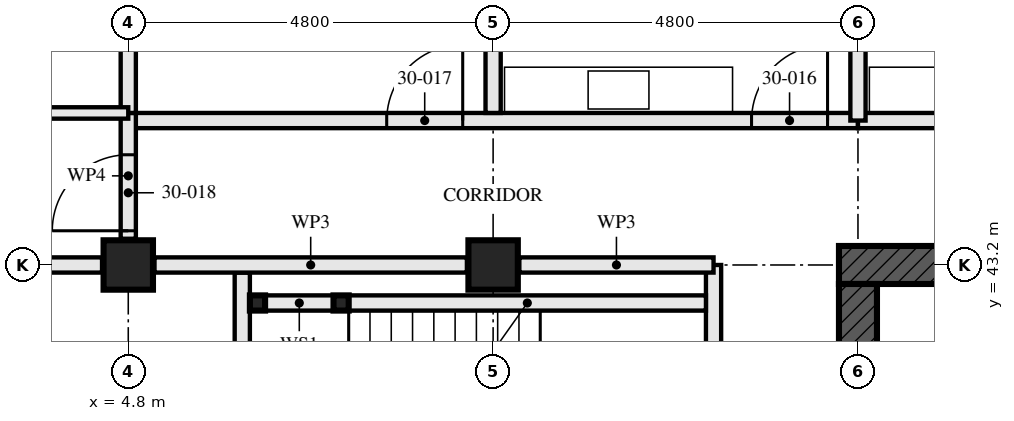
"""IFC4 building model, lengths in metres.
Left out: names, types, materials, properties, quantities, classifications, styles, units other than length and angle.
Written with IfcOpenShell. Run it as: python <this file> out.ifc"""

import sys

from ifc_helpers import new_model, si_unit, direction, frame, frame_2d, origin, origin_2d, place, context, subcontext, project, spatial, rectangle, hollow_rectangle, extrude, element, fill, save


model = new_model("IFC4")
c1 = context("Model", 3, precision=1e-05, world=origin(), true_north=direction((0.0, 1.0)))
c2 = subcontext(c1, "Body", "Model", "MODEL_VIEW")
j1 = project(units=[si_unit("LENGTHUNIT", "METRE"), si_unit("PLANEANGLEUNIT", "RADIAN")], contexts=[c1])
p1 = place(None, origin())
s1 = spatial("IfcSite", under=j1, at=p1, CompositionType="ELEMENT")
p2 = place(p1, origin())
s2 = spatial("IfcBuilding", under=s1, at=p2, CompositionType="ELEMENT")
p3 = place(p2, frame((0.0, 0.0, 112.0)))
s3 = spatial("IfcBuildingStorey", under=s2, at=p3, CompositionType="ELEMENT", Elevation=112.0)
for number, where, z_axis, x_axis in (
    (1, (4.8, 43.2, 0.0), (0.0, 0.0, 1.0), (0.0, 1.0, 0.0)),
    (2, (9.6, 43.2, 0.0), (0.0, 0.0, 1.0), (0.0, 1.0, 0.0)),
):
    element("IfcColumn", number, at=place(p3, frame(where, z_axis=z_axis, x_axis=x_axis)), inside=s3, PredefinedType="COLUMN", context=c2, shape_type="SweptSolid", body=[
        extrude(hollow_rectangle(XDim=0.65, YDim=0.65, WallThickness=0.05, at=origin_2d()), origin(), (0.0, 0.0, 1.0), 3.5),
    ])
p4 = place(p3, frame((29.05, 43.2, -0.17), z_axis=(0.0, 0.0, 1.0), x_axis=(-1.0, 0.0, 0.0)))
e3 = element("IfcWall", 3, at=p4, inside=s3, PredefinedType="SHEAR", context=c2, shape_type="SweptSolid", body=[
    extrude(rectangle(XDim=14.9, YDim=0.5, at=frame_2d((7.45, 0.0))), origin(), (0.0, 0.0, 1.0), 3.5),
])
p5 = place(p4, frame((6.85, 0.0, 0.17)))
e4 = element("IfcOpeningElement", 4, at=p5, cuts=e3, PredefinedType="OPENING", context=c2, shape_type="SweptSolid", body=[
    extrude(rectangle(XDim=1.2, YDim=2.1, at=frame_2d((0.6, 1.05))), frame((0.0, 0.26, 0.0), z_axis=(0.0, -1.0, 0.0), x_axis=(1.0, 0.0, 0.0)), (0.0, 0.0, 1.0), 0.521),
])
p6 = place(p3, frame((14.4, 42.95, -0.17), z_axis=(0.0, 0.0, 1.0), x_axis=(0.0, -1.0, 0.0)))
e5 = element("IfcWall", 5, at=p6, inside=s3, PredefinedType="SHEAR", context=c2, shape_type="SweptSolid", body=[
    extrude(rectangle(XDim=13.9, YDim=0.5, at=frame_2d((6.95, 0.0))), origin(), (0.0, 0.0, 1.0), 3.5),
])
p7 = place(p6, frame((6.35, 0.0, 0.17)))
e6 = element("IfcOpeningElement", 6, at=p7, cuts=e5, PredefinedType="OPENING", context=c2, shape_type="SweptSolid", body=[
    extrude(rectangle(XDim=1.2, YDim=2.1, at=frame_2d((0.6, 1.05))), frame((0.0, 0.26, 0.0), z_axis=(0.0, -1.0, 0.0), x_axis=(1.0, 0.0, 0.0)), (0.0, 0.0, 1.0), 0.521),
])
for number, where, z_axis, x_axis in (
    (7, (6.5, 42.7, 0.0), (0.0, 0.0, 1.0), (1.0, 0.0, 0.0)),
    (8, (7.6, 42.7, 0.0), (0.0, 0.0, 1.0), (1.0, 0.0, 0.0)),
):
    element("IfcColumn", number, at=place(p3, frame(where, z_axis=z_axis, x_axis=x_axis)), inside=s3, PredefinedType="COLUMN", context=c2, shape_type="SweptSolid", body=[
        extrude(hollow_rectangle(XDim=0.2, YDim=0.2, WallThickness=0.008, at=origin_2d()), origin(), (0.0, 0.0, 1.0), 3.33),
    ])
p8 = place(p3, frame((6.6, 42.7, 0.0), z_axis=(0.0, 0.0, 1.0), x_axis=(1.0, 0.0, 0.0)))
e9 = element("IfcWall", 9, at=p8, inside=s3, PredefinedType="SOLIDWALL", context=c2, shape_type="SweptSolid", body=[
    extrude(rectangle(XDim=0.9, YDim=0.2, at=frame_2d((0.45, 0.0))), origin(), (0.0, 0.0, 1.0), 2.99),
])
p9 = place(p3, frame((7.7, 42.7, 0.0), z_axis=(0.0, 0.0, 1.0), x_axis=(1.0, 0.0, 0.0)))
e10 = element("IfcWall", 10, at=p9, inside=s3, PredefinedType="SOLIDWALL", context=c2, shape_type="SweptSolid", body=[
    extrude(rectangle(XDim=4.7, YDim=0.2, at=frame_2d((2.35, 0.0))), origin(), (0.0, 0.0, 1.0), 2.99),
])
p10 = place(p3, frame((6.3, 43.1, 0.0), z_axis=(0.0, 0.0, 1.0), x_axis=(0.0, -1.0, 0.0)))
e11 = element("IfcWall", 11, at=p10, inside=s3, PredefinedType="SOLIDWALL", context=c2, shape_type="SweptSolid", body=[
    extrude(rectangle(XDim=3.3, YDim=0.2, at=frame_2d((1.65, 0.0))), origin(), (0.0, 0.0, 1.0), 3.33),
])
p11 = place(p3, frame((12.5, 43.2, 0.0), z_axis=(0.0, 0.0, 1.0), x_axis=(0.0, -1.0, 0.0)))
e12 = element("IfcWall", 12, at=p11, inside=s3, PredefinedType="PARTITIONING", context=c2, shape_type="SweptSolid", body=[
    extrude(rectangle(XDim=14.84, YDim=0.2, at=frame_2d((7.42, 0.0))), origin(), (0.0, 0.0, 1.0), 2.32),
])
p12 = place(p11, frame((1.4, 0.0, 0.0)))
e13 = element("IfcOpeningElement", 13, at=p12, cuts=e12, PredefinedType="OPENING", context=c2, shape_type="SweptSolid", body=[
    extrude(rectangle(XDim=1.0, YDim=2.1, at=frame_2d((0.5, 1.05))), frame((0.0, 0.111, 0.0), z_axis=(0.0, -1.0, 0.0), x_axis=(1.0, 0.0, 0.0)), (0.0, 0.0, 1.0), 0.221),
])
p13 = place(p11, frame((5.2, 0.0, 0.0)))
e14 = element("IfcOpeningElement", 14, at=p13, cuts=e12, PredefinedType="OPENING", context=c2, shape_type="SweptSolid", body=[
    extrude(rectangle(XDim=1.0, YDim=2.1, at=frame_2d((0.5, 1.05))), frame((0.0, 0.111, 0.0), z_axis=(0.0, -1.0, 0.0), x_axis=(1.0, 0.0, 0.0)), (0.0, 0.0, 1.0), 0.221),
])
p14 = place(p11, frame((13.0, 0.0, 0.0)))
e15 = element("IfcOpeningElement", 15, at=p14, cuts=e12, PredefinedType="OPENING", context=c2, shape_type="SweptSolid", body=[
    extrude(rectangle(XDim=1.0, YDim=2.1, at=frame_2d((0.5, 1.05))), frame((0.0, 0.111, 0.0), z_axis=(0.0, -1.0, 0.0), x_axis=(1.0, 0.0, 0.0)), (0.0, 0.0, 1.0), 0.221),
])
p15 = place(p3, frame((9.6, 57.356, 0.0), z_axis=(0.0, 0.0, 1.0), x_axis=(0.0, -1.0, 0.0)))
e16 = element("IfcWall", 16, at=p15, inside=s3, PredefinedType="PARTITIONING", context=c2, shape_type="SweptSolid", body=[
    extrude(rectangle(XDim=12.156, YDim=0.2, at=frame_2d((6.078, 0.0))), origin(), (0.0, 0.0, 1.0), 2.55),
])
p16 = place(p3, frame((4.8, 52.48, 0.0), z_axis=(0.0, 0.0, 1.0), x_axis=(0.0, -1.0, 0.0)))
e17 = element("IfcWall", 17, at=p16, inside=s3, PredefinedType="PARTITIONING", context=c2, shape_type="SweptSolid", body=[
    extrude(rectangle(XDim=7.28, YDim=0.2, at=frame_2d((3.64, 0.0))), origin(), (0.0, 0.0, 1.0), 2.55),
])
p17 = place(p3, frame((4.8, 45.2, 0.0), z_axis=(0.0, 0.0, 1.0), x_axis=(-1.0, 0.0, 0.0)))
e18 = element("IfcWall", 18, at=p17, inside=s3, PredefinedType="PARTITIONING", context=c2, shape_type="SweptSolid", body=[
    extrude(rectangle(XDim=2.8, YDim=0.15, at=frame_2d((1.4, 0.0))), origin(), (0.0, 0.0, 1.0), 3.33),
])
p18 = place(p3, frame((14.4, 45.1, 0.0), z_axis=(0.0, 0.0, 1.0), x_axis=(-1.0, 0.0, 0.0)))
e19 = element("IfcWall", 19, at=p18, inside=s3, PredefinedType="PARTITIONING", context=c2, shape_type="SweptSolid", body=[
    extrude(rectangle(XDim=9.6, YDim=0.2, at=frame_2d((4.8, 0.0))), origin(), (0.0, 0.0, 1.0), 3.33),
])
p19 = place(p18, frame((0.4, 0.0, 0.0)))
e20 = element("IfcOpeningElement", 20, at=p19, cuts=e19, PredefinedType="OPENING", context=c2, shape_type="SweptSolid", body=[
    extrude(rectangle(XDim=1.0, YDim=2.1, at=frame_2d((0.5, 1.05))), frame((0.0, 0.111, 0.0), z_axis=(0.0, -1.0, 0.0), x_axis=(1.0, 0.0, 0.0)), (0.0, 0.0, 1.0), 0.221),
])
p20 = place(p18, frame((5.2, 0.0, 0.0)))
e21 = element("IfcOpeningElement", 21, at=p20, cuts=e19, PredefinedType="OPENING", context=c2, shape_type="SweptSolid", body=[
    extrude(rectangle(XDim=1.0, YDim=2.1, at=frame_2d((0.5, 1.05))), frame((0.0, 0.111, 0.0), z_axis=(0.0, -1.0, 0.0), x_axis=(1.0, 0.0, 0.0)), (0.0, 0.0, 1.0), 0.221),
])
p21 = place(p3, frame((4.8, 45.2, 0.0), z_axis=(0.0, 0.0, 1.0), x_axis=(0.0, -1.0, 0.0)))
e22 = element("IfcWall", 22, at=p21, inside=s3, PredefinedType="PARTITIONING", context=c2, shape_type="SweptSolid", body=[
    extrude(rectangle(XDim=1.655, YDim=0.2, at=frame_2d((0.828, 0.0))), origin(), (0.0, 0.0, 1.0), 3.33),
])
p22 = place(p21, frame((0.55, 0.0, 0.0)))
e23 = element("IfcOpeningElement", 23, at=p22, cuts=e22, PredefinedType="OPENING", context=c2, shape_type="SweptSolid", body=[
    extrude(rectangle(XDim=1.0, YDim=2.1, at=frame_2d((0.5, 1.05))), frame((0.0, 0.111, 0.0), z_axis=(0.0, -1.0, 0.0), x_axis=(1.0, 0.0, 0.0)), (0.0, 0.0, 1.0), 0.221),
])
p23 = place(p3, frame((29.24, 45.1, 0.0), z_axis=(0.0, 0.0, 1.0), x_axis=(-1.0, 0.0, 0.0)))
e24 = element("IfcWall", 24, at=p23, inside=s3, PredefinedType="PARTITIONING", context=c2, shape_type="SweptSolid", body=[
    extrude(rectangle(XDim=14.84, YDim=0.2, at=frame_2d((7.42, 0.0))), origin(), (0.0, 0.0, 1.0), 2.32),
])
p24 = place(p23, frame((0.84, 0.0, 0.0)))
e25 = element("IfcOpeningElement", 25, at=p24, cuts=e24, PredefinedType="OPENING", context=c2, shape_type="SweptSolid", body=[
    extrude(rectangle(XDim=1.0, YDim=2.1, at=frame_2d((0.5, 1.05))), frame((0.0, 0.111, 0.0), z_axis=(0.0, -1.0, 0.0), x_axis=(1.0, 0.0, 0.0)), (0.0, 0.0, 1.0), 0.221),
])
p25 = place(p23, frame((10.44, 0.0, 0.0)))
e26 = element("IfcOpeningElement", 26, at=p25, cuts=e24, PredefinedType="OPENING", context=c2, shape_type="SweptSolid", body=[
    extrude(rectangle(XDim=1.0, YDim=2.1, at=frame_2d((0.5, 1.05))), frame((0.0, 0.111, 0.0), z_axis=(0.0, -1.0, 0.0), x_axis=(1.0, 0.0, 0.0)), (0.0, 0.0, 1.0), 0.221),
])
p26 = place(p3, frame((12.5, 43.2, 0.0), z_axis=(0.0, 0.0, 1.0), x_axis=(-1.0, 0.0, 0.0)))
e27 = element("IfcWall", 27, at=p26, inside=s3, PredefinedType="PARTITIONING", context=c2, shape_type="SweptSolid", body=[
    extrude(rectangle(XDim=2.555, YDim=0.2, at=frame_2d((1.277, 0.0))), origin(), (0.0, 0.0, 1.0), 2.32),
])
p27 = place(p3, frame((9.255, 43.2, 0.0), z_axis=(0.0, 0.0, 1.0), x_axis=(-1.0, 0.0, 0.0)))
e28 = element("IfcWall", 28, at=p27, inside=s3, PredefinedType="PARTITIONING", context=c2, shape_type="SweptSolid", body=[
    extrude(rectangle(XDim=4.11, YDim=0.2, at=frame_2d((2.055, 0.0))), origin(), (0.0, 0.0, 1.0), 2.32),
])
p28 = place(p3, frame((4.455, 43.2, 0.0), z_axis=(0.0, 0.0, 1.0), x_axis=(-1.0, 0.0, 0.0)))
e29 = element("IfcWall", 29, at=p28, inside=s3, PredefinedType="PARTITIONING", context=c2, shape_type="SweptSolid", body=[
    extrude(rectangle(XDim=4.16, YDim=0.2, at=frame_2d((2.08, 0.0))), origin(), (0.0, 0.0, 1.0), 2.32),
])
p29 = place(p3, frame((14.4, 45.1, 0.0), z_axis=(0.0, 0.0, 1.0), x_axis=(0.0, 1.0, 0.0)))
e30 = element("IfcWall", 30, at=p29, inside=s3, PredefinedType="PARTITIONING", context=c2, shape_type="SweptSolid", body=[
    extrude(rectangle(XDim=2.615, YDim=0.2, at=frame_2d((1.307, 0.0))), origin(), (0.0, 0.0, 1.0), 2.32),
])
p30 = place(p19, frame((1.0, 0.0, 0.0), z_axis=(0.0, 0.0, 1.0), x_axis=(-1.0, 0.0, 0.0)))
e31 = element("IfcDoor", 31, at=p30, inside=s3, OperationType="SINGLE_SWING_LEFT", PredefinedType="DOOR", context=c2, shape_type="SweptSolid", body=[
    extrude(rectangle(XDim=1.0, YDim=2.1, at=frame_2d((0.5, 1.05))), frame((0.0, 0.027, 0.0), z_axis=(0.0, -1.0, 0.0), x_axis=(1.0, 0.0, 0.0)), (0.0, 0.0, 1.0), 0.054),
])
fill(e20, e31)
p31 = place(p20, frame((1.0, 0.0, 0.0), z_axis=(0.0, 0.0, 1.0), x_axis=(-1.0, 0.0, 0.0)))
e32 = element("IfcDoor", 32, at=p31, inside=s3, OperationType="SINGLE_SWING_LEFT", PredefinedType="DOOR", context=c2, shape_type="SweptSolid", body=[
    extrude(rectangle(XDim=1.0, YDim=2.1, at=frame_2d((0.5, 1.05))), frame((0.0, 0.027, 0.0), z_axis=(0.0, -1.0, 0.0), x_axis=(1.0, 0.0, 0.0)), (0.0, 0.0, 1.0), 0.054),
])
fill(e21, e32)
p32 = place(p22, frame((1.0, 0.0, 0.0), z_axis=(0.0, 0.0, 1.0), x_axis=(-1.0, 0.0, 0.0)))
e33 = element("IfcDoor", 33, at=p32, inside=s3, OperationType="SINGLE_SWING_RIGHT", PredefinedType="DOOR", context=c2, shape_type="SweptSolid", body=[
    extrude(rectangle(XDim=1.0, YDim=2.1, at=frame_2d((0.5, 1.05))), frame((0.0, 0.027, 0.0), z_axis=(0.0, -1.0, 0.0), x_axis=(1.0, 0.0, 0.0)), (0.0, 0.0, 1.0), 0.054),
])
fill(e23, e33)
save(model, sys.argv[1])
